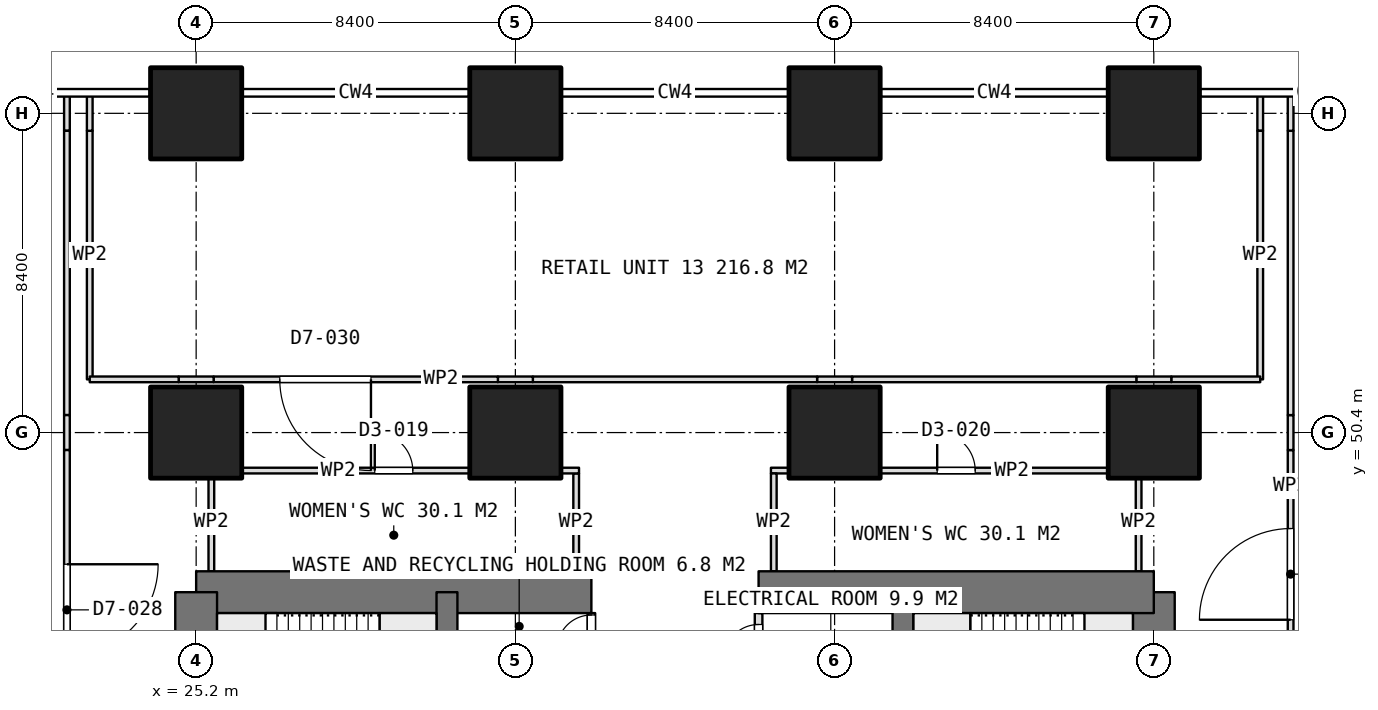
"""IFC4 building model, lengths in metres.
Left out: names, types, materials, properties, quantities, classifications, styles, units other than length and angle.
Written with IfcOpenShell. Run it as: python <this file> out.ifc"""

import sys

from ifc_helpers import new_model, si_unit, direction, frame, frame_2d, origin, origin_2d, place, context, subcontext, project, spatial, rectangle, extrude, element, fill, save


model = new_model("IFC4")
c1 = context("Model", 3, precision=1e-05, world=origin(), true_north=direction((0.0, 1.0)))
c2 = subcontext(c1, "Body", "Model", "MODEL_VIEW")
j1 = project(units=[si_unit("LENGTHUNIT", "METRE"), si_unit("PLANEANGLEUNIT", "RADIAN")], contexts=[c1])
p1 = place(None, origin())
s1 = spatial("IfcSite", under=j1, at=p1, CompositionType="ELEMENT")
p2 = place(p1, origin())
s2 = spatial("IfcBuilding", under=s1, at=p2, CompositionType="ELEMENT")
p3 = place(p2, frame((0.0, 0.0, 10.4)))
s3 = spatial("IfcBuildingStorey", under=s2, at=p3, CompositionType="ELEMENT", Elevation=10.4)
p4 = place(p3, frame((25.2, 46.2, 0.0), z_axis=(0.0, 0.0, 1.0), x_axis=(1.0, 0.0, 0.0)))
e1 = element("IfcWall", 1, at=p4, inside=s3, PredefinedType="SHEAR", context=c2, shape_type="SweptSolid", body=[
    extrude(rectangle(XDim=10.4, YDim=1.1, at=frame_2d((5.2, 0.0))), origin(), (0.0, 0.0, 1.0), 5.0),
])
p5 = place(p3, frame((40.0, 46.2, 0.0), z_axis=(0.0, 0.0, 1.0), x_axis=(1.0, 0.0, 0.0)))
e2 = element("IfcWall", 2, at=p5, inside=s3, PredefinedType="SHEAR", context=c2, shape_type="SweptSolid", body=[
    extrude(rectangle(XDim=10.4, YDim=1.1, at=frame_2d((5.2, 0.0))), origin(), (0.0, 0.0, 1.0), 5.0),
])
p6 = place(p3, frame((25.2, 21.0, 0.0), z_axis=(0.0, 0.0, 1.0), x_axis=(0.0, 1.0, 0.0)))
e3 = element("IfcWall", 3, at=p6, inside=s3, PredefinedType="SHEAR", context=c2, shape_type="SweptSolid", body=[
    extrude(rectangle(XDim=25.2, YDim=1.1, at=frame_2d((12.6, 0.0))), origin(), (0.0, 0.0, 1.0), 5.0),
])
p7 = place(p6, frame((7.8, 0.0, 0.0)))
e4 = element("IfcOpeningElement", 4, at=p7, cuts=e3, PredefinedType="OPENING", context=c2, shape_type="SweptSolid", body=[
    extrude(rectangle(XDim=1.2, YDim=2.1, at=frame_2d((0.6, 1.05))), frame((0.0, 0.56, 0.0), z_axis=(0.0, -1.0, 0.0), x_axis=(1.0, 0.0, 0.0)), (0.0, 0.0, 1.0), 1.12),
])
p8 = place(p6, frame((14.25, 0.0, 0.0)))
e5 = element("IfcOpeningElement", 5, at=p8, cuts=e3, PredefinedType="OPENING", context=c2, shape_type="SweptSolid", body=[
    extrude(rectangle(XDim=0.9, YDim=2.1, at=frame_2d((0.45, 1.05))), frame((0.0, 0.56, 0.0), z_axis=(0.0, -1.0, 0.0), x_axis=(1.0, 0.0, 0.0)), (0.0, 0.0, 1.0), 1.12),
])
p9 = place(p6, frame((16.85, 0.0, 0.0)))
e6 = element("IfcOpeningElement", 6, at=p9, cuts=e3, PredefinedType="OPENING", context=c2, shape_type="SweptSolid", body=[
    extrude(rectangle(XDim=0.9, YDim=2.1, at=frame_2d((0.45, 1.05))), frame((0.0, 0.56, 0.0), z_axis=(0.0, -1.0, 0.0), x_axis=(1.0, 0.0, 0.0)), (0.0, 0.0, 1.0), 1.12),
])
p10 = place(p6, frame((19.075, 0.0, 0.0)))
e7 = element("IfcOpeningElement", 7, at=p10, cuts=e3, PredefinedType="OPENING", context=c2, shape_type="SweptSolid", body=[
    extrude(rectangle(XDim=1.2, YDim=2.1, at=frame_2d((0.6, 1.05))), frame((0.0, 0.56, 0.0), z_axis=(0.0, -1.0, 0.0), x_axis=(1.0, 0.0, 0.0)), (0.0, 0.0, 1.0), 1.12),
])
p11 = place(p3, frame((50.4, 21.0, 0.0), z_axis=(0.0, 0.0, 1.0), x_axis=(0.0, 1.0, 0.0)))
e8 = element("IfcWall", 8, at=p11, inside=s3, PredefinedType="SHEAR", context=c2, shape_type="SweptSolid", body=[
    extrude(rectangle(XDim=25.2, YDim=1.1, at=frame_2d((12.6, 0.0))), origin(), (0.0, 0.0, 1.0), 5.0),
])
p12 = place(p11, frame((16.2, 0.0, 0.0)))
e9 = element("IfcOpeningElement", 9, at=p12, cuts=e8, PredefinedType="OPENING", context=c2, shape_type="SweptSolid", body=[
    extrude(rectangle(XDim=1.2, YDim=2.1, at=frame_2d((0.6, 1.05))), frame((0.0, 0.56, 0.0), z_axis=(0.0, -1.0, 0.0), x_axis=(1.0, 0.0, 0.0)), (0.0, 0.0, 1.0), 1.12),
])
p13 = place(p11, frame((10.05, 0.0, 0.0)))
e10 = element("IfcOpeningElement", 10, at=p13, cuts=e8, PredefinedType="OPENING", context=c2, shape_type="SweptSolid", body=[
    extrude(rectangle(XDim=0.9, YDim=2.1, at=frame_2d((0.45, 1.05))), frame((0.0, 0.56, 0.0), z_axis=(0.0, -1.0, 0.0), x_axis=(1.0, 0.0, 0.0)), (0.0, 0.0, 1.0), 1.12),
])
p14 = place(p11, frame((7.45, 0.0, 0.0)))
e11 = element("IfcOpeningElement", 11, at=p14, cuts=e8, PredefinedType="OPENING", context=c2, shape_type="SweptSolid", body=[
    extrude(rectangle(XDim=0.9, YDim=2.1, at=frame_2d((0.45, 1.05))), frame((0.0, 0.56, 0.0), z_axis=(0.0, -1.0, 0.0), x_axis=(1.0, 0.0, 0.0)), (0.0, 0.0, 1.0), 1.12),
])
p15 = place(p11, frame((0.75, 0.0, 0.0)))
e12 = element("IfcOpeningElement", 12, at=p15, cuts=e8, PredefinedType="OPENING", context=c2, shape_type="SweptSolid", body=[
    extrude(rectangle(XDim=1.2, YDim=2.1, at=frame_2d((0.6, 1.05))), frame((0.0, 0.56, 0.0), z_axis=(0.0, -1.0, 0.0), x_axis=(1.0, 0.0, 0.0)), (0.0, 0.0, 1.0), 1.12),
])
for number, where, z_axis, x_axis in (
    (13, (31.8, 21.0, 0.0), (0.0, 0.0, 1.0), (0.0, 1.0, 0.0)),
    (14, (43.8, 21.0, 0.0), (0.0, 0.0, 1.0), (0.0, 1.0, 0.0)),
):
    element("IfcWall", number, at=place(p3, frame(where, z_axis=z_axis, x_axis=x_axis)), inside=s3, PredefinedType="SHEAR", context=c2, shape_type="SweptSolid", body=[
        extrude(rectangle(XDim=25.2, YDim=0.55, at=frame_2d((12.6, 0.0))), origin(), (0.0, 0.0, 1.0), 5.0),
    ])
for number, where, z_axis, x_axis in (
    (15, (25.2, 50.4, 0.0), (0.0, 0.0, 1.0), (1.0, 0.0, 0.0)),
    (16, (25.2, 58.8, 0.0), (0.0, 0.0, 1.0), (1.0, 0.0, 0.0)),
    (17, (33.6, 50.4, 0.0), (0.0, 0.0, 1.0), (1.0, 0.0, 0.0)),
    (18, (33.6, 58.8, 0.0), (0.0, 0.0, 1.0), (1.0, 0.0, 0.0)),
    (19, (42.0, 50.4, 0.0), (0.0, 0.0, 1.0), (1.0, 0.0, 0.0)),
    (20, (42.0, 58.8, 0.0), (0.0, 0.0, 1.0), (1.0, 0.0, 0.0)),
    (21, (50.4, 50.4, 0.0), (0.0, 0.0, 1.0), (1.0, 0.0, 0.0)),
    (22, (50.4, 58.8, 0.0), (0.0, 0.0, 1.0), (1.0, 0.0, 0.0)),
):
    element("IfcColumn", number, at=place(p3, frame(where, z_axis=z_axis, x_axis=x_axis)), inside=s3, PredefinedType="COLUMN", context=c2, shape_type="SweptSolid", body=[
        extrude(rectangle(XDim=2.4, YDim=2.4, at=origin_2d()), origin(), (0.0, 0.0, 1.0), 5.0),
    ])
p16 = place(p3, frame((40.0, 41.675, 0.0), z_axis=(0.0, 0.0, 1.0), x_axis=(0.0, 1.0, 0.0)))
e23 = element("IfcWall", 23, at=p16, inside=s3, PredefinedType="PARTITIONING", context=c2, shape_type="SweptSolid", body=[
    extrude(rectangle(XDim=3.975, YDim=0.2, at=frame_2d((1.987, 0.0))), origin(), (0.0, 0.0, 1.0), 4.7),
])
p17 = place(p16, frame((2.775, 0.0, 0.0)))
e24 = element("IfcOpeningElement", 24, at=p17, cuts=e23, PredefinedType="OPENING", context=c2, shape_type="SweptSolid", body=[
    extrude(rectangle(XDim=0.9, YDim=2.1, at=frame_2d((0.45, 1.05))), frame((0.0, 0.11, 0.0), z_axis=(0.0, -1.0, 0.0), x_axis=(1.0, 0.0, 0.0)), (0.0, 0.0, 1.0), 0.22),
])
p18 = place(p16, frame((0.325, 0.0, 0.0)))
e25 = element("IfcOpeningElement", 25, at=p18, cuts=e23, PredefinedType="OPENING", context=c2, shape_type="SweptSolid", body=[
    extrude(rectangle(XDim=1.0, YDim=2.1, at=frame_2d((0.5, 1.05))), frame((0.0, 0.11, 0.0), z_axis=(0.0, -1.0, 0.0), x_axis=(1.0, 0.0, 0.0)), (0.0, 0.0, 1.0), 0.22),
])
p19 = place(p3, frame((35.6, 41.675, 0.0), z_axis=(0.0, 0.0, 1.0), x_axis=(0.0, 1.0, 0.0)))
e26 = element("IfcWall", 26, at=p19, inside=s3, PredefinedType="PARTITIONING", context=c2, shape_type="SweptSolid", body=[
    extrude(rectangle(XDim=3.975, YDim=0.2, at=frame_2d((1.987, 0.0))), origin(), (0.0, 0.0, 1.0), 4.7),
])
p20 = place(p19, frame((3.025, 0.0, 0.0)))
e27 = element("IfcOpeningElement", 27, at=p20, cuts=e26, PredefinedType="OPENING", context=c2, shape_type="SweptSolid", body=[
    extrude(rectangle(XDim=0.9, YDim=2.1, at=frame_2d((0.45, 1.05))), frame((0.0, 0.11, 0.0), z_axis=(0.0, -1.0, 0.0), x_axis=(1.0, 0.0, 0.0)), (0.0, 0.0, 1.0), 0.22),
])
p21 = place(p19, frame((0.675, 0.0, 0.0)))
e28 = element("IfcOpeningElement", 28, at=p21, cuts=e26, PredefinedType="OPENING", context=c2, shape_type="SweptSolid", body=[
    extrude(rectangle(XDim=1.1, YDim=2.1, at=frame_2d((0.55, 1.05))), frame((0.0, 0.11, 0.0), z_axis=(0.0, -1.0, 0.0), x_axis=(1.0, 0.0, 0.0)), (0.0, 0.0, 1.0), 0.22),
])
p22 = place(p3, frame((40.325, 49.4, 0.0), z_axis=(0.0, 0.0, 1.0), x_axis=(1.0, 0.0, 0.0)))
e29 = element("IfcWall", 29, at=p22, inside=s3, PredefinedType="PARTITIONING", context=c2, shape_type="SweptSolid", body=[
    extrude(rectangle(XDim=9.75, YDim=0.15, at=frame_2d((4.875, 0.0))), origin(), (0.0, 0.0, 1.0), 4.7),
])
p23 = place(p22, frame((4.375, 0.0, 0.0)))
e30 = element("IfcOpeningElement", 30, at=p23, cuts=e29, PredefinedType="OPENING", context=c2, shape_type="SweptSolid", body=[
    extrude(rectangle(XDim=1.0, YDim=2.1, at=frame_2d((0.5, 1.05))), frame((0.0, 0.085, 0.0), z_axis=(0.0, -1.0, 0.0), x_axis=(1.0, 0.0, 0.0)), (0.0, 0.0, 1.0), 0.17),
])
for number, where, z_axis, x_axis in (
    (31, (40.4, 46.75, 0.0), (0.0, 0.0, 1.0), (0.0, 1.0, 0.0)),
    (32, (50.0, 46.75, 0.0), (0.0, 0.0, 1.0), (0.0, 1.0, 0.0)),
):
    element("IfcWall", number, at=place(p3, frame(where, z_axis=z_axis, x_axis=x_axis)), inside=s3, PredefinedType="PARTITIONING", context=c2, shape_type="SweptSolid", body=[
        extrude(rectangle(XDim=2.575, YDim=0.15, at=frame_2d((1.288, 0.0))), origin(), (0.0, 0.0, 1.0), 4.7),
    ])
p24 = place(p3, frame((25.525, 49.4, 0.0), z_axis=(0.0, 0.0, 1.0), x_axis=(1.0, 0.0, 0.0)))
e33 = element("IfcWall", 33, at=p24, inside=s3, PredefinedType="PARTITIONING", context=c2, shape_type="SweptSolid", body=[
    extrude(rectangle(XDim=9.75, YDim=0.15, at=frame_2d((4.875, 0.0))), origin(), (0.0, 0.0, 1.0), 4.7),
])
p25 = place(p24, frame((4.375, 0.0, 0.0)))
e34 = element("IfcOpeningElement", 34, at=p25, cuts=e33, PredefinedType="OPENING", context=c2, shape_type="SweptSolid", body=[
    extrude(rectangle(XDim=1.0, YDim=2.1, at=frame_2d((0.5, 1.05))), frame((0.0, 0.085, 0.0), z_axis=(0.0, -1.0, 0.0), x_axis=(1.0, 0.0, 0.0)), (0.0, 0.0, 1.0), 0.17),
])
for number, where, z_axis, x_axis in (
    (35, (25.6, 46.75, 0.0), (0.0, 0.0, 1.0), (0.0, 1.0, 0.0)),
    (36, (35.2, 46.75, 0.0), (0.0, 0.0, 1.0), (0.0, 1.0, 0.0)),
):
    element("IfcWall", number, at=place(p3, frame(where, z_axis=z_axis, x_axis=x_axis)), inside=s3, PredefinedType="PARTITIONING", context=c2, shape_type="SweptSolid", body=[
        extrude(rectangle(XDim=2.575, YDim=0.15, at=frame_2d((1.288, 0.0))), origin(), (0.0, 0.0, 1.0), 4.7),
    ])
p26 = place(p3, frame((21.8, 59.29, 0.0), z_axis=(0.0, 0.0, 1.0), x_axis=(0.0, -1.0, 0.0)))
e37 = element("IfcWall", 37, at=p26, inside=s3, PredefinedType="PARTITIONING", context=c2, shape_type="SweptSolid", body=[
    extrude(rectangle(XDim=0.95, YDim=0.15, at=frame_2d((0.475, 0.0))), origin(), (0.0, 0.0, 1.0), 2.9),
])
p27 = place(p3, frame((21.8, 58.34, 0.0), z_axis=(0.0, 0.0, 1.0), x_axis=(0.0, -1.0, 0.0)))
e38 = element("IfcWall", 38, at=p27, inside=s3, PredefinedType="PARTITIONING", context=c2, shape_type="SweptSolid", body=[
    extrude(rectangle(XDim=7.48, YDim=0.15, at=frame_2d((3.74, 0.0))), origin(), (0.0, 0.0, 1.0), 4.7),
])
p28 = place(p3, frame((21.8, 50.86, 0.0), z_axis=(0.0, 0.0, 1.0), x_axis=(0.0, -1.0, 0.0)))
e39 = element("IfcWall", 39, at=p28, inside=s3, PredefinedType="PARTITIONING", context=c2, shape_type="SweptSolid", body=[
    extrude(rectangle(XDim=0.92, YDim=0.15, at=frame_2d((0.46, 0.0))), origin(), (0.0, 0.0, 1.0), 2.9),
])
p29 = place(p3, frame((21.8, 49.94, 0.0), z_axis=(0.0, 0.0, 1.0), x_axis=(0.0, -1.0, 0.0)))
e40 = element("IfcWall", 40, at=p29, inside=s3, PredefinedType="PARTITIONING", context=c2, shape_type="SweptSolid", body=[
    extrude(rectangle(XDim=9.34, YDim=0.15, at=frame_2d((4.67, 0.0))), origin(), (0.0, 0.0, 1.0), 4.7),
])
p30 = place(p29, frame((3.005, 0.0, 0.0)))
e41 = element("IfcOpeningElement", 41, at=p30, cuts=e40, PredefinedType="OPENING", context=c2, shape_type="SweptSolid", body=[
    extrude(rectangle(XDim=2.4, YDim=2.4, at=frame_2d((1.2, 1.2))), frame((0.0, 0.085, 0.0), z_axis=(0.0, -1.0, 0.0), x_axis=(1.0, 0.0, 0.0)), (0.0, 0.0, 1.0), 0.17),
])
p31 = place(p3, frame((54.0, 40.6, 0.0), z_axis=(0.0, 0.0, 1.0), x_axis=(0.0, 1.0, 0.0)))
e42 = element("IfcWall", 42, at=p31, inside=s3, PredefinedType="PARTITIONING", context=c2, shape_type="SweptSolid", body=[
    extrude(rectangle(XDim=9.34, YDim=0.15, at=frame_2d((4.67, 0.0))), origin(), (0.0, 0.0, 1.0), 4.7),
])
p32 = place(p31, frame((4.875, 0.0, 0.0)))
e43 = element("IfcOpeningElement", 43, at=p32, cuts=e42, PredefinedType="OPENING", context=c2, shape_type="SweptSolid", body=[
    extrude(rectangle(XDim=2.4, YDim=2.4, at=frame_2d((1.2, 1.2))), frame((0.0, 0.085, 0.0), z_axis=(0.0, -1.0, 0.0), x_axis=(1.0, 0.0, 0.0)), (0.0, 0.0, 1.0), 0.17),
])
p33 = place(p31, frame((0.47, 0.0, 0.0)))
e44 = element("IfcOpeningElement", 44, at=p33, cuts=e42, PredefinedType="OPENING", context=c2, shape_type="SweptSolid", body=[
    extrude(rectangle(XDim=2.4, YDim=2.4, at=frame_2d((1.2, 1.2))), frame((0.0, 0.085, 0.0), z_axis=(0.0, -1.0, 0.0), x_axis=(1.0, 0.0, 0.0)), (0.0, 0.0, 1.0), 0.17),
])
p34 = place(p3, frame((54.0, 49.94, 0.0), z_axis=(0.0, 0.0, 1.0), x_axis=(0.0, 1.0, 0.0)))
e45 = element("IfcWall", 45, at=p34, inside=s3, PredefinedType="PARTITIONING", context=c2, shape_type="SweptSolid", body=[
    extrude(rectangle(XDim=0.92, YDim=0.15, at=frame_2d((0.46, 0.0))), origin(), (0.0, 0.0, 1.0), 2.9),
])
p35 = place(p3, frame((54.0, 50.86, 0.0), z_axis=(0.0, 0.0, 1.0), x_axis=(0.0, 1.0, 0.0)))
e46 = element("IfcWall", 46, at=p35, inside=s3, PredefinedType="PARTITIONING", context=c2, shape_type="SweptSolid", body=[
    extrude(rectangle(XDim=7.48, YDim=0.15, at=frame_2d((3.74, 0.0))), origin(), (0.0, 0.0, 1.0), 4.7),
])
p36 = place(p3, frame((54.0, 58.34, 0.0), z_axis=(0.0, 0.0, 1.0), x_axis=(0.0, 1.0, 0.0)))
e47 = element("IfcWall", 47, at=p36, inside=s3, PredefinedType="PARTITIONING", context=c2, shape_type="SweptSolid", body=[
    extrude(rectangle(XDim=0.95, YDim=0.15, at=frame_2d((0.475, 0.0))), origin(), (0.0, 0.0, 1.0), 2.9),
])
p37 = place(p3, frame((53.2, 51.8, 0.0), z_axis=(0.0, 0.0, 1.0), x_axis=(-1.0, 0.0, 0.0)))
e48 = element("IfcWall", 48, at=p37, inside=s3, PredefinedType="PARTITIONING", context=c2, shape_type="SweptSolid", body=[
    extrude(rectangle(XDim=2.34, YDim=0.15, at=frame_2d((1.17, 0.0))), origin(), (0.0, 0.0, 1.0), 4.7),
])
p38 = place(p3, frame((50.86, 51.8, 0.0), z_axis=(0.0, 0.0, 1.0), x_axis=(-1.0, 0.0, 0.0)))
e49 = element("IfcWall", 49, at=p38, inside=s3, PredefinedType="PARTITIONING", context=c2, shape_type="SweptSolid", body=[
    extrude(rectangle(XDim=0.92, YDim=0.15, at=frame_2d((0.46, 0.0))), origin(), (0.0, 0.0, 1.0), 2.9),
])
p39 = place(p3, frame((49.94, 51.8, 0.0), z_axis=(0.0, 0.0, 1.0), x_axis=(-1.0, 0.0, 0.0)))
e50 = element("IfcWall", 50, at=p39, inside=s3, PredefinedType="PARTITIONING", context=c2, shape_type="SweptSolid", body=[
    extrude(rectangle(XDim=7.48, YDim=0.15, at=frame_2d((3.74, 0.0))), origin(), (0.0, 0.0, 1.0), 4.7),
])
p40 = place(p3, frame((42.46, 51.8, 0.0), z_axis=(0.0, 0.0, 1.0), x_axis=(-1.0, 0.0, 0.0)))
e51 = element("IfcWall", 51, at=p40, inside=s3, PredefinedType="PARTITIONING", context=c2, shape_type="SweptSolid", body=[
    extrude(rectangle(XDim=0.92, YDim=0.15, at=frame_2d((0.46, 0.0))), origin(), (0.0, 0.0, 1.0), 2.9),
])
p41 = place(p3, frame((41.54, 51.8, 0.0), z_axis=(0.0, 0.0, 1.0), x_axis=(-1.0, 0.0, 0.0)))
e52 = element("IfcWall", 52, at=p41, inside=s3, PredefinedType="PARTITIONING", context=c2, shape_type="SweptSolid", body=[
    extrude(rectangle(XDim=7.48, YDim=0.15, at=frame_2d((3.74, 0.0))), origin(), (0.0, 0.0, 1.0), 4.7),
])
p42 = place(p3, frame((34.06, 51.8, 0.0), z_axis=(0.0, 0.0, 1.0), x_axis=(-1.0, 0.0, 0.0)))
e53 = element("IfcWall", 53, at=p42, inside=s3, PredefinedType="PARTITIONING", context=c2, shape_type="SweptSolid", body=[
    extrude(rectangle(XDim=0.92, YDim=0.15, at=frame_2d((0.46, 0.0))), origin(), (0.0, 0.0, 1.0), 2.9),
])
p43 = place(p3, frame((33.14, 51.8, 0.0), z_axis=(0.0, 0.0, 1.0), x_axis=(-1.0, 0.0, 0.0)))
e54 = element("IfcWall", 54, at=p43, inside=s3, PredefinedType="PARTITIONING", context=c2, shape_type="SweptSolid", body=[
    extrude(rectangle(XDim=7.48, YDim=0.15, at=frame_2d((3.74, 0.0))), origin(), (0.0, 0.0, 1.0), 4.7),
])
p44 = place(p43, frame((3.34, 0.0, 0.0)))
e55 = element("IfcOpeningElement", 55, at=p44, cuts=e54, PredefinedType="OPENING", context=c2, shape_type="SweptSolid", body=[
    extrude(rectangle(XDim=2.4, YDim=2.4, at=frame_2d((1.2, 1.2))), frame((0.0, 0.085, 0.0), z_axis=(0.0, -1.0, 0.0), x_axis=(1.0, 0.0, 0.0)), (0.0, 0.0, 1.0), 0.17),
])
p45 = place(p3, frame((25.66, 51.8, 0.0), z_axis=(0.0, 0.0, 1.0), x_axis=(-1.0, 0.0, 0.0)))
e56 = element("IfcWall", 56, at=p45, inside=s3, PredefinedType="PARTITIONING", context=c2, shape_type="SweptSolid", body=[
    extrude(rectangle(XDim=0.92, YDim=0.15, at=frame_2d((0.46, 0.0))), origin(), (0.0, 0.0, 1.0), 2.9),
])
p46 = place(p3, frame((24.74, 51.8, 0.0), z_axis=(0.0, 0.0, 1.0), x_axis=(-1.0, 0.0, 0.0)))
e57 = element("IfcWall", 57, at=p46, inside=s3, PredefinedType="PARTITIONING", context=c2, shape_type="SweptSolid", body=[
    extrude(rectangle(XDim=2.34, YDim=0.15, at=frame_2d((1.17, 0.0))), origin(), (0.0, 0.0, 1.0), 4.7),
])
p47 = place(p3, frame((22.4, 51.8, 0.0), z_axis=(0.0, 0.0, 1.0), x_axis=(0.0, 1.0, 0.0)))
e58 = element("IfcWall", 58, at=p47, inside=s3, PredefinedType="PARTITIONING", context=c2, shape_type="SweptSolid", body=[
    extrude(rectangle(XDim=6.54, YDim=0.15, at=frame_2d((3.27, 0.0))), origin(), (0.0, 0.0, 1.0), 4.7),
])
for number, where, z_axis, x_axis in (
    (59, (22.4, 58.34, 0.0), (0.0, 0.0, 1.0), (0.0, 1.0, 0.0)),
    (60, (53.2, 59.29, 0.0), (0.0, 0.0, 1.0), (0.0, -1.0, 0.0)),
):
    element("IfcWall", number, at=place(p3, frame(where, z_axis=z_axis, x_axis=x_axis)), inside=s3, PredefinedType="PARTITIONING", context=c2, shape_type="SweptSolid", body=[
        extrude(rectangle(XDim=0.95, YDim=0.15, at=frame_2d((0.475, 0.0))), origin(), (0.0, 0.0, 1.0), 2.9),
    ])
p48 = place(p3, frame((53.2, 58.34, 0.0), z_axis=(0.0, 0.0, 1.0), x_axis=(0.0, -1.0, 0.0)))
e61 = element("IfcWall", 61, at=p48, inside=s3, PredefinedType="PARTITIONING", context=c2, shape_type="SweptSolid", body=[
    extrude(rectangle(XDim=6.54, YDim=0.15, at=frame_2d((3.27, 0.0))), origin(), (0.0, 0.0, 1.0), 4.7),
])
p49 = place(p17, origin())
e62 = element("IfcDoor", 62, at=p49, inside=s3, OperationType="SINGLE_SWING_LEFT", PredefinedType="DOOR", context=c2, shape_type="SweptSolid", body=[
    extrude(rectangle(XDim=0.9, YDim=2.1, at=frame_2d((0.45, 1.05))), frame((0.0, 0.025, 0.0), z_axis=(0.0, -1.0, 0.0), x_axis=(1.0, 0.0, 0.0)), (0.0, 0.0, 1.0), 0.05),
])
fill(e24, e62)
p50 = place(p20, origin())
e63 = element("IfcDoor", 63, at=p50, inside=s3, OperationType="SINGLE_SWING_LEFT", PredefinedType="DOOR", context=c2, shape_type="SweptSolid", body=[
    extrude(rectangle(XDim=0.9, YDim=2.1, at=frame_2d((0.45, 1.05))), frame((0.0, 0.025, 0.0), z_axis=(0.0, -1.0, 0.0), x_axis=(1.0, 0.0, 0.0)), (0.0, 0.0, 1.0), 0.05),
])
fill(e27, e63)
p51 = place(p23, origin())
e64 = element("IfcDoor", 64, at=p51, inside=s3, OperationType="SINGLE_SWING_LEFT", PredefinedType="DOOR", context=c2, shape_type="SweptSolid", body=[
    extrude(rectangle(XDim=1.0, YDim=2.1, at=frame_2d((0.5, 1.05))), frame((0.0, 0.025, 0.0), z_axis=(0.0, -1.0, 0.0), x_axis=(1.0, 0.0, 0.0)), (0.0, 0.0, 1.0), 0.05),
])
fill(e30, e64)
p52 = place(p25, origin())
e65 = element("IfcDoor", 65, at=p52, inside=s3, OperationType="SINGLE_SWING_LEFT", PredefinedType="DOOR", context=c2, shape_type="SweptSolid", body=[
    extrude(rectangle(XDim=1.0, YDim=2.1, at=frame_2d((0.5, 1.05))), frame((0.0, 0.025, 0.0), z_axis=(0.0, -1.0, 0.0), x_axis=(1.0, 0.0, 0.0)), (0.0, 0.0, 1.0), 0.05),
])
fill(e34, e65)
p53 = place(p30, origin())
e66 = element("IfcDoor", 66, at=p53, inside=s3, OperationType="DOUBLE_DOOR_SINGLE_SWING", PredefinedType="DOOR", context=c2, shape_type="SweptSolid", body=[
    extrude(rectangle(XDim=2.4, YDim=2.4, at=frame_2d((1.2, 1.2))), frame((0.0, 0.025, 0.0), z_axis=(0.0, -1.0, 0.0), x_axis=(1.0, 0.0, 0.0)), (0.0, 0.0, 1.0), 0.05),
])
fill(e41, e66)
p54 = place(p32, origin())
e67 = element("IfcDoor", 67, at=p54, inside=s3, OperationType="DOUBLE_DOOR_SINGLE_SWING", PredefinedType="DOOR", context=c2, shape_type="SweptSolid", body=[
    extrude(rectangle(XDim=2.4, YDim=2.4, at=frame_2d((1.2, 1.2))), frame((0.0, 0.025, 0.0), z_axis=(0.0, -1.0, 0.0), x_axis=(1.0, 0.0, 0.0)), (0.0, 0.0, 1.0), 0.05),
])
fill(e43, e67)
p55 = place(p44, origin())
e68 = element("IfcDoor", 68, at=p55, inside=s3, OperationType="DOUBLE_DOOR_SINGLE_SWING", PredefinedType="DOOR", context=c2, shape_type="SweptSolid", body=[
    extrude(rectangle(XDim=2.4, YDim=2.4, at=frame_2d((1.2, 1.2))), frame((0.0, 0.025, 0.0), z_axis=(0.0, -1.0, 0.0), x_axis=(1.0, 0.0, 0.0)), (0.0, 0.0, 1.0), 0.05),
])
fill(e55, e68)
save(model, sys.argv[1])
